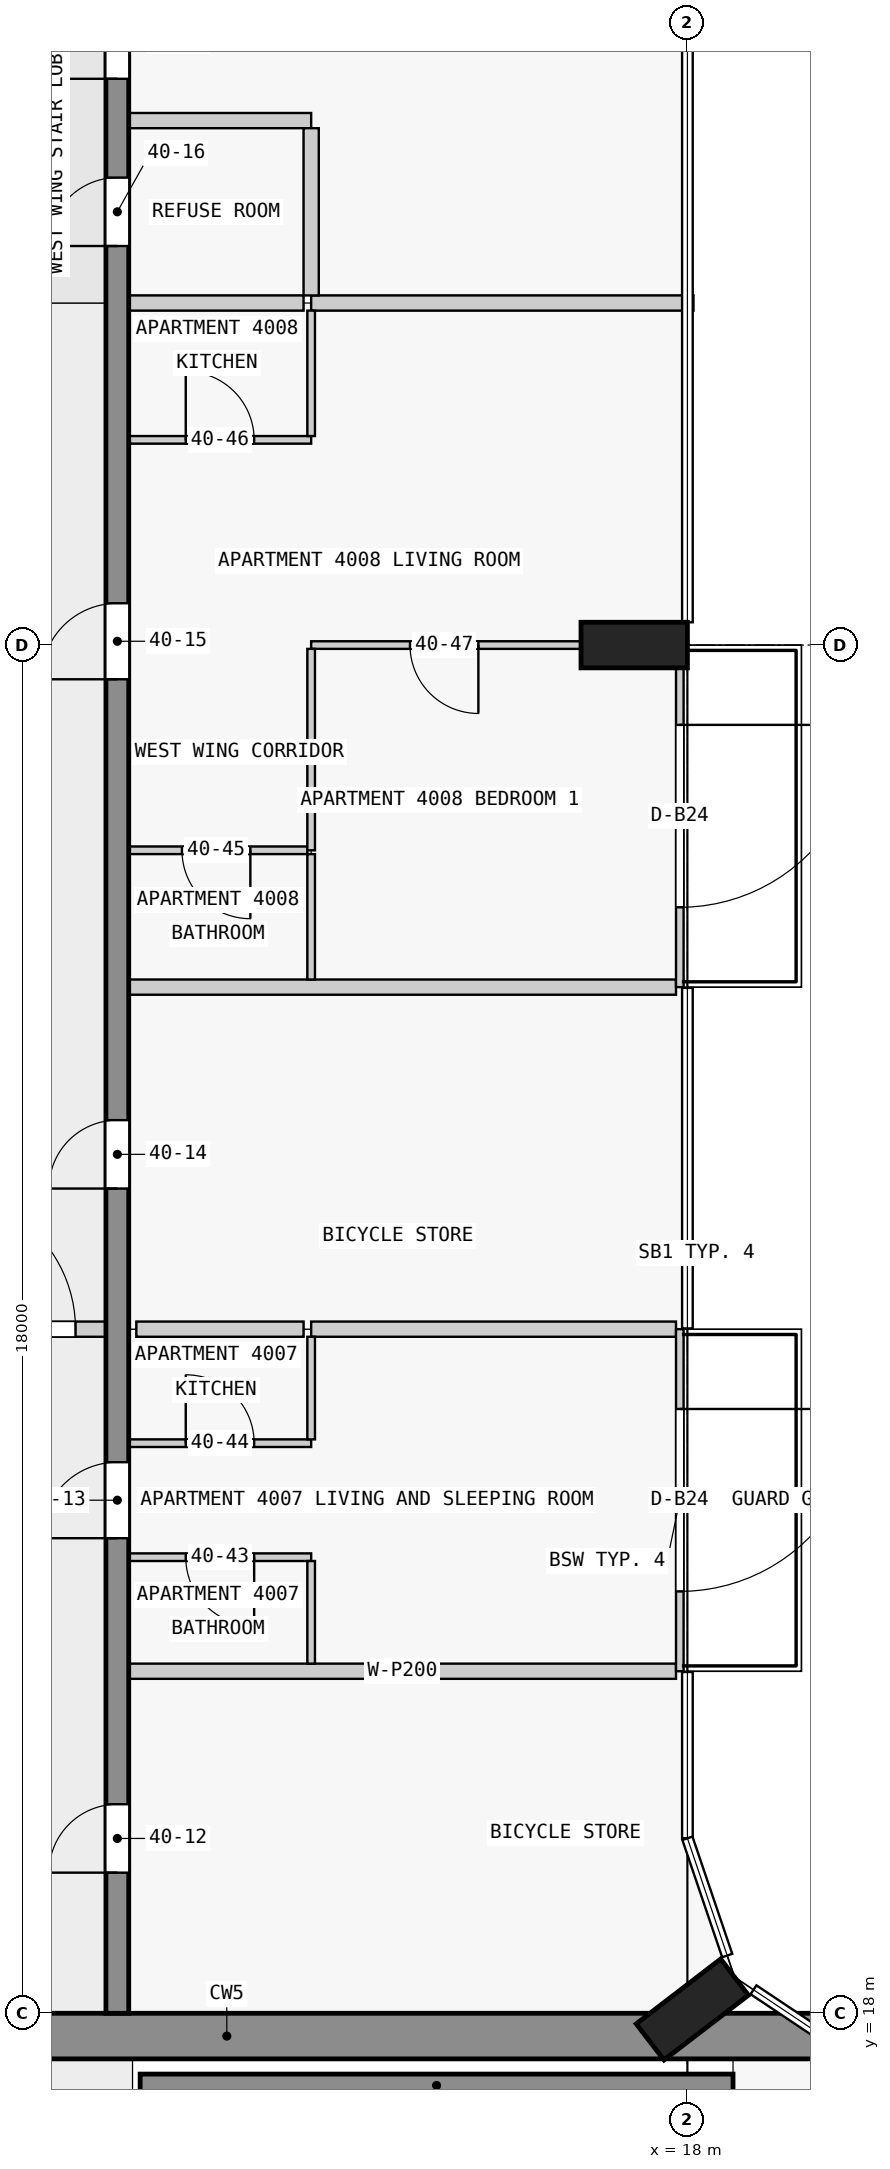
"""IFC4 building model, lengths in metres.
Left out: names, types, materials, properties, quantities, classifications, styles, units other than length and angle.
Written with IfcOpenShell. Run it as: python <this file> out.ifc"""

import sys

from ifc_helpers import new_model, si_unit, direction, frame, frame_2d, origin, origin_2d, place, context, subcontext, project, spatial, rectangle, extrude, element, fill, save


model = new_model("IFC4")
c1 = context("Model", 3, precision=1e-05, world=origin(), true_north=direction((0.0, 1.0)))
c2 = subcontext(c1, "Body", "Model", "MODEL_VIEW")
j1 = project(units=[si_unit("LENGTHUNIT", "METRE"), si_unit("PLANEANGLEUNIT", "RADIAN")], contexts=[c1])
p1 = place(None, origin())
s1 = spatial("IfcSite", under=j1, at=p1, CompositionType="ELEMENT")
p2 = place(p1, origin())
s2 = spatial("IfcBuilding", under=s1, at=p2, CompositionType="ELEMENT")
p3 = place(p2, frame((0.0, 0.0, 156.9)))
s3 = spatial("IfcBuildingStorey", under=s2, at=p3, CompositionType="ELEMENT", Elevation=156.9)
for number, where, z_axis, x_axis in (
    (1, (18.065, 18.05, 0.0), (0.0, 0.0, 1.0), (-0.609, 0.793, 0.0)),
    (2, (17.3, 36.0, 0.0), (0.0, 0.0, 1.0), (0.0, 1.0, 0.0)),
):
    element("IfcColumn", number, at=place(p3, frame(where, z_axis=z_axis, x_axis=x_axis)), inside=s3, PredefinedType="COLUMN", context=c2, shape_type="SweptSolid", body=[
        extrude(rectangle(XDim=0.6, YDim=1.4, at=origin_2d()), origin(), (0.0, 0.0, 1.0), 3.5),
    ])
p4 = place(p3, frame((1.38, 17.7, 0.0), z_axis=(0.0, 0.0, 1.0), x_axis=(1.0, 0.0, 0.0)))
e3 = element("IfcWall", 3, at=p4, inside=s3, PredefinedType="SHEAR", context=c2, shape_type="SweptSolid", body=[
    extrude(rectangle(XDim=21.12, YDim=0.6, at=frame_2d((10.56, 0.0))), origin(), (0.0, 0.0, 1.0), 3.25),
])
p5 = place(p4, frame((6.4, 0.0, 0.0)))
e4 = element("IfcOpeningElement", 4, at=p5, cuts=e3, PredefinedType="OPENING", context=c2, shape_type="SweptSolid", body=[
    extrude(rectangle(XDim=1.8, YDim=2.1, at=frame_2d((0.9, 1.05))), frame((0.0, 0.31, 0.0), z_axis=(0.0, -1.0, 0.0), x_axis=(1.0, 0.0, 0.0)), (0.0, 0.0, 1.0), 0.62),
])
p6 = place(p3, frame((10.8, 17.05, 0.0), z_axis=(0.0, 0.0, 1.0), x_axis=(1.0, 0.0, 0.0)))
e5 = element("IfcWall", 5, at=p6, inside=s3, PredefinedType="SHEAR", context=c2, shape_type="SweptSolid", body=[
    extrude(rectangle(XDim=7.8, YDim=0.3, at=frame_2d((3.9, 0.0))), origin(), (0.0, 0.0, 1.0), 3.25),
])
p7 = place(p3, frame((10.5, 18.0, 0.0), z_axis=(0.0, 0.0, 1.0), x_axis=(0.0, 1.0, 0.0)))
e6 = element("IfcWall", 6, at=p7, inside=s3, PredefinedType="SHEAR", context=c2, shape_type="SweptSolid", body=[
    extrude(rectangle(XDim=27.0, YDim=0.3, at=frame_2d((13.5, 0.0))), origin(), (0.0, 0.0, 1.0), 3.25),
])
p8 = place(p7, frame((1.85, 0.0, 0.0)))
e7 = element("IfcOpeningElement", 7, at=p8, cuts=e6, PredefinedType="OPENING", context=c2, shape_type="SweptSolid", body=[
    extrude(rectangle(XDim=0.9, YDim=2.1, at=frame_2d((0.45, 1.05))), frame((0.0, 0.16, 0.0), z_axis=(0.0, -1.0, 0.0), x_axis=(1.0, 0.0, 0.0)), (0.0, 0.0, 1.0), 0.32),
])
p9 = place(p7, frame((6.25, 0.0, 0.0)))
e8 = element("IfcOpeningElement", 8, at=p9, cuts=e6, PredefinedType="OPENING", context=c2, shape_type="SweptSolid", body=[
    extrude(rectangle(XDim=1.0, YDim=2.1, at=frame_2d((0.5, 1.05))), frame((0.0, 0.16, 0.0), z_axis=(0.0, -1.0, 0.0), x_axis=(1.0, 0.0, 0.0)), (0.0, 0.0, 1.0), 0.32),
])
p10 = place(p7, frame((10.85, 0.0, 0.0)))
e9 = element("IfcOpeningElement", 9, at=p10, cuts=e6, PredefinedType="OPENING", context=c2, shape_type="SweptSolid", body=[
    extrude(rectangle(XDim=0.9, YDim=2.1, at=frame_2d((0.45, 1.05))), frame((0.0, 0.16, 0.0), z_axis=(0.0, -1.0, 0.0), x_axis=(1.0, 0.0, 0.0)), (0.0, 0.0, 1.0), 0.32),
])
p11 = place(p7, frame((17.55, 0.0, 0.0)))
e10 = element("IfcOpeningElement", 10, at=p11, cuts=e6, PredefinedType="OPENING", context=c2, shape_type="SweptSolid", body=[
    extrude(rectangle(XDim=1.0, YDim=2.1, at=frame_2d((0.5, 1.05))), frame((0.0, 0.16, 0.0), z_axis=(0.0, -1.0, 0.0), x_axis=(1.0, 0.0, 0.0)), (0.0, 0.0, 1.0), 0.32),
])
p12 = place(p7, frame((23.25, 0.0, 0.0)))
e11 = element("IfcOpeningElement", 11, at=p12, cuts=e6, PredefinedType="OPENING", context=c2, shape_type="SweptSolid", body=[
    extrude(rectangle(XDim=0.9, YDim=2.1, at=frame_2d((0.45, 1.05))), frame((0.0, 0.16, 0.0), z_axis=(0.0, -1.0, 0.0), x_axis=(1.0, 0.0, 0.0)), (0.0, 0.0, 1.0), 0.32),
])
p13 = place(p7, frame((25.45, 0.0, 0.0)))
e12 = element("IfcOpeningElement", 12, at=p13, cuts=e6, PredefinedType="OPENING", context=c2, shape_type="SweptSolid", body=[
    extrude(rectangle(XDim=1.0, YDim=2.1, at=frame_2d((0.5, 1.05))), frame((0.0, 0.16, 0.0), z_axis=(0.0, -1.0, 0.0), x_axis=(1.0, 0.0, 0.0)), (0.0, 0.0, 1.0), 0.32),
])
p14 = place(p3, frame((17.9, 27.0, 0.0), z_axis=(0.0, 0.0, 1.0), x_axis=(0.0, -1.0, 0.0)))
e13 = element("IfcWall", 13, at=p14, inside=s3, PredefinedType="STANDARD", context=c2, shape_type="SweptSolid", body=[
    extrude(rectangle(XDim=4.5, YDim=0.1, at=frame_2d((2.25, 0.0))), origin(), (0.0, 0.0, 1.0), 3.25),
])
p15 = place(p14, frame((1.05, 0.0, 0.0)))
e14 = element("IfcOpeningElement", 14, at=p15, cuts=e13, PredefinedType="OPENING", context=c2, shape_type="SweptSolid", body=[
    extrude(rectangle(XDim=2.4, YDim=2.4, at=frame_2d((1.2, 1.2))), frame((0.0, 0.06, 0.0), z_axis=(0.0, -1.0, 0.0), x_axis=(1.0, 0.0, 0.0)), (0.0, 0.0, 1.0), 0.12),
])
p16 = place(p3, frame((17.9, 36.0, 0.0), z_axis=(0.0, 0.0, 1.0), x_axis=(0.0, -1.0, 0.0)))
e15 = element("IfcWall", 15, at=p16, inside=s3, PredefinedType="STANDARD", context=c2, shape_type="SweptSolid", body=[
    extrude(rectangle(XDim=4.5, YDim=0.1, at=frame_2d((2.25, 0.0))), origin(), (0.0, 0.0, 1.0), 3.25),
])
p17 = place(p16, frame((1.05, 0.0, 0.0)))
e16 = element("IfcOpeningElement", 16, at=p17, cuts=e15, PredefinedType="OPENING", context=c2, shape_type="SweptSolid", body=[
    extrude(rectangle(XDim=2.4, YDim=2.4, at=frame_2d((1.2, 1.2))), frame((0.0, 0.06, 0.0), z_axis=(0.0, -1.0, 0.0), x_axis=(1.0, 0.0, 0.0)), (0.0, 0.0, 1.0), 0.12),
])
p18 = place(p3, frame((17.85, 22.5, 0.0), z_axis=(0.0, 0.0, 1.0), x_axis=(-1.0, 0.0, 0.0)))
e17 = element("IfcWall", 17, at=p18, inside=s3, PredefinedType="PARTITIONING", context=c2, shape_type="SweptSolid", body=[
    extrude(rectangle(XDim=7.2, YDim=0.2, at=frame_2d((3.6, 0.0))), origin(), (0.0, 0.0, 1.0), 3.25),
])
p19 = place(p3, frame((13.05, 24.0, 0.0), z_axis=(0.0, 0.0, 1.0), x_axis=(-1.0, 0.0, 0.0)))
e18 = element("IfcWall", 18, at=p19, inside=s3, PredefinedType="PARTITIONING", context=c2, shape_type="SweptSolid", body=[
    extrude(rectangle(XDim=2.4, YDim=0.1, at=frame_2d((1.2, 0.0))), origin(), (0.0, 0.0, 1.0), 3.25),
])
p20 = place(p19, frame((0.75, 0.0, 0.0)))
e19 = element("IfcOpeningElement", 19, at=p20, cuts=e18, PredefinedType="OPENING", context=c2, shape_type="SweptSolid", body=[
    extrude(rectangle(XDim=0.9, YDim=2.1, at=frame_2d((0.45, 1.05))), frame((0.0, 0.06, 0.0), z_axis=(0.0, -1.0, 0.0), x_axis=(1.0, 0.0, 0.0)), (0.0, 0.0, 1.0), 0.12),
])
p21 = place(p3, frame((10.65, 25.5, 0.0), z_axis=(0.0, 0.0, 1.0), x_axis=(1.0, 0.0, 0.0)))
e20 = element("IfcWall", 20, at=p21, inside=s3, PredefinedType="PARTITIONING", context=c2, shape_type="SweptSolid", body=[
    extrude(rectangle(XDim=2.4, YDim=0.1, at=frame_2d((1.2, 0.0))), origin(), (0.0, 0.0, 1.0), 3.25),
])
p22 = place(p21, frame((0.75, 0.0, 0.0)))
e21 = element("IfcOpeningElement", 21, at=p22, cuts=e20, PredefinedType="OPENING", context=c2, shape_type="SweptSolid", body=[
    extrude(rectangle(XDim=0.9, YDim=2.1, at=frame_2d((0.45, 1.05))), frame((0.0, 0.06, 0.0), z_axis=(0.0, -1.0, 0.0), x_axis=(1.0, 0.0, 0.0)), (0.0, 0.0, 1.0), 0.12),
])
p23 = place(p3, frame((12.95, 27.0, 0.0), z_axis=(0.0, 0.0, 1.0), x_axis=(-1.0, 0.0, 0.0)))
e22 = element("IfcWall", 22, at=p23, inside=s3, PredefinedType="PARTITIONING", context=c2, shape_type="SweptSolid", body=[
    extrude(rectangle(XDim=2.2, YDim=0.2, at=frame_2d((1.1, 0.0))), origin(), (0.0, 0.0, 1.0), 3.25),
])
p24 = place(p3, frame((13.05, 27.0, 0.0), z_axis=(0.0, 0.0, 1.0), x_axis=(1.0, 0.0, 0.0)))
e23 = element("IfcWall", 23, at=p24, inside=s3, PredefinedType="PARTITIONING", context=c2, shape_type="SweptSolid", body=[
    extrude(rectangle(XDim=4.8, YDim=0.2, at=frame_2d((2.4, 0.0))), origin(), (0.0, 0.0, 1.0), 3.25),
])
p25 = place(p3, frame((17.85, 31.5, 0.0), z_axis=(0.0, 0.0, 1.0), x_axis=(-1.0, 0.0, 0.0)))
e24 = element("IfcWall", 24, at=p25, inside=s3, PredefinedType="PARTITIONING", context=c2, shape_type="SweptSolid", body=[
    extrude(rectangle(XDim=7.2, YDim=0.2, at=frame_2d((3.6, 0.0))), origin(), (0.0, 0.0, 1.0), 3.25),
])
p26 = place(p3, frame((13.0, 33.3, 0.0), z_axis=(0.0, 0.0, 1.0), x_axis=(-1.0, 0.0, 0.0)))
e25 = element("IfcWall", 25, at=p26, inside=s3, PredefinedType="PARTITIONING", context=c2, shape_type="SweptSolid", body=[
    extrude(rectangle(XDim=2.35, YDim=0.1, at=frame_2d((1.175, 0.0))), origin(), (0.0, 0.0, 1.0), 3.25),
])
p27 = place(p26, frame((0.75, 0.0, 0.0)))
e26 = element("IfcOpeningElement", 26, at=p27, cuts=e25, PredefinedType="OPENING", context=c2, shape_type="SweptSolid", body=[
    extrude(rectangle(XDim=0.9, YDim=2.1, at=frame_2d((0.45, 1.05))), frame((0.0, 0.06, 0.0), z_axis=(0.0, -1.0, 0.0), x_axis=(1.0, 0.0, 0.0)), (0.0, 0.0, 1.0), 0.12),
])
p28 = place(p3, frame((16.6, 36.0, 0.0), z_axis=(0.0, 0.0, 1.0), x_axis=(-1.0, 0.0, 0.0)))
e27 = element("IfcWall", 27, at=p28, inside=s3, PredefinedType="PARTITIONING", context=c2, shape_type="SweptSolid", body=[
    extrude(rectangle(XDim=3.55, YDim=0.1, at=frame_2d((1.775, 0.0))), origin(), (0.0, 0.0, 1.0), 3.25),
])
p29 = place(p28, frame((1.35, 0.0, 0.0)))
e28 = element("IfcOpeningElement", 28, at=p29, cuts=e27, PredefinedType="OPENING", context=c2, shape_type="SweptSolid", body=[
    extrude(rectangle(XDim=0.9, YDim=2.1, at=frame_2d((0.45, 1.05))), frame((0.0, 0.06, 0.0), z_axis=(0.0, -1.0, 0.0), x_axis=(1.0, 0.0, 0.0)), (0.0, 0.0, 1.0), 0.12),
])
p30 = place(p3, frame((10.65, 38.7, 0.0), z_axis=(0.0, 0.0, 1.0), x_axis=(1.0, 0.0, 0.0)))
e29 = element("IfcWall", 29, at=p30, inside=s3, PredefinedType="PARTITIONING", context=c2, shape_type="SweptSolid", body=[
    extrude(rectangle(XDim=2.4, YDim=0.1, at=frame_2d((1.2, 0.0))), origin(), (0.0, 0.0, 1.0), 3.25),
])
p31 = place(p30, frame((0.75, 0.0, 0.0)))
e30 = element("IfcOpeningElement", 30, at=p31, cuts=e29, PredefinedType="OPENING", context=c2, shape_type="SweptSolid", body=[
    extrude(rectangle(XDim=0.9, YDim=2.1, at=frame_2d((0.45, 1.05))), frame((0.0, 0.06, 0.0), z_axis=(0.0, -1.0, 0.0), x_axis=(1.0, 0.0, 0.0)), (0.0, 0.0, 1.0), 0.12),
])
p32 = place(p3, frame((12.95, 40.5, 0.0), z_axis=(0.0, 0.0, 1.0), x_axis=(-1.0, 0.0, 0.0)))
e31 = element("IfcWall", 31, at=p32, inside=s3, PredefinedType="PARTITIONING", context=c2, shape_type="SweptSolid", body=[
    extrude(rectangle(XDim=2.3, YDim=0.2, at=frame_2d((1.15, 0.0))), origin(), (0.0, 0.0, 1.0), 3.25),
])
p33 = place(p3, frame((13.05, 40.5, 0.0), z_axis=(0.0, 0.0, 1.0), x_axis=(1.0, 0.0, 0.0)))
e32 = element("IfcWall", 32, at=p33, inside=s3, PredefinedType="PARTITIONING", context=c2, shape_type="SweptSolid", body=[
    extrude(rectangle(XDim=5.03, YDim=0.2, at=frame_2d((2.515, 0.0))), origin(), (0.0, 0.0, 1.0), 3.25),
])
p34 = place(p3, frame((13.05, 42.9, 0.0), z_axis=(0.0, 0.0, 1.0), x_axis=(-1.0, 0.0, 0.0)))
e33 = element("IfcWall", 33, at=p34, inside=s3, PredefinedType="PARTITIONING", context=c2, shape_type="SweptSolid", body=[
    extrude(rectangle(XDim=2.4, YDim=0.2, at=frame_2d((1.2, 0.0))), origin(), (0.0, 0.0, 1.0), 3.25),
])
p35 = place(p3, frame((13.05, 35.95, 0.0), z_axis=(0.0, 0.0, 1.0), x_axis=(0.0, -1.0, 0.0)))
e34 = element("IfcWall", 34, at=p35, inside=s3, PredefinedType="PARTITIONING", context=c2, shape_type="SweptSolid", body=[
    extrude(rectangle(XDim=2.65, YDim=0.1, at=frame_2d((1.325, 0.0))), origin(), (0.0, 0.0, 1.0), 3.25),
])
for number, where, z_axis, x_axis in (
    (35, (13.05, 22.6, 0.0), (0.0, 0.0, 1.0), (0.0, 1.0, 0.0)),
    (36, (13.05, 25.55, 0.0), (0.0, 0.0, 1.0), (0.0, 1.0, 0.0)),
):
    element("IfcWall", number, at=place(p3, frame(where, z_axis=z_axis, x_axis=x_axis)), inside=s3, PredefinedType="PARTITIONING", context=c2, shape_type="SweptSolid", body=[
        extrude(rectangle(XDim=1.35, YDim=0.1, at=frame_2d((0.675, 0.0))), origin(), (0.0, 0.0, 1.0), 3.25),
    ])
for number, where, z_axis, x_axis in (
    (37, (13.05, 31.6, 0.0), (0.0, 0.0, 1.0), (0.0, 1.0, 0.0)),
    (38, (13.05, 38.75, 0.0), (0.0, 0.0, 1.0), (0.0, 1.0, 0.0)),
):
    element("IfcWall", number, at=place(p3, frame(where, z_axis=z_axis, x_axis=x_axis)), inside=s3, PredefinedType="PARTITIONING", context=c2, shape_type="SweptSolid", body=[
        extrude(rectangle(XDim=1.65, YDim=0.1, at=frame_2d((0.825, 0.0))), origin(), (0.0, 0.0, 1.0), 3.25),
    ])
p36 = place(p3, frame((13.05, 40.6, 0.0), z_axis=(0.0, 0.0, 1.0), x_axis=(0.0, 1.0, 0.0)))
e39 = element("IfcWall", 39, at=p36, inside=s3, PredefinedType="PARTITIONING", context=c2, shape_type="SweptSolid", body=[
    extrude(rectangle(XDim=2.2, YDim=0.2, at=frame_2d((1.1, 0.0))), origin(), (0.0, 0.0, 1.0), 3.25),
])
p37 = place(p3, frame((7.45, 27.0, 0.0), z_axis=(0.0, 0.0, 1.0), x_axis=(1.0, 0.0, 0.0)))
e40 = element("IfcWall", 40, at=p37, inside=s3, PredefinedType="PARTITIONING", context=c2, shape_type="SweptSolid", body=[
    extrude(rectangle(XDim=3.2, YDim=0.2, at=frame_2d((1.6, 0.0))), origin(), (0.0, 0.0, 1.0), 3.25),
])
p38 = place(p37, frame((0.7, 0.0, 0.0)))
e41 = element("IfcOpeningElement", 41, at=p38, cuts=e40, PredefinedType="OPENING", context=c2, shape_type="SweptSolid", body=[
    extrude(rectangle(XDim=1.8, YDim=2.1, at=frame_2d((0.9, 1.05))), frame((0.0, 0.11, 0.0), z_axis=(0.0, -1.0, 0.0), x_axis=(1.0, 0.0, 0.0)), (0.0, 0.0, 1.0), 0.22),
])
p39 = place(p15, origin())
e42 = element("IfcDoor", 42, at=p39, inside=s3, OperationType="SINGLE_SWING_LEFT", PredefinedType="DOOR", context=c2, shape_type="SweptSolid", body=[
    extrude(rectangle(XDim=2.4, YDim=2.4, at=frame_2d((1.2, 1.2))), frame((0.0, 0.025, 0.0), z_axis=(0.0, -1.0, 0.0), x_axis=(1.0, 0.0, 0.0)), (0.0, 0.0, 1.0), 0.05),
])
fill(e14, e42)
p40 = place(p17, origin())
e43 = element("IfcDoor", 43, at=p40, inside=s3, OperationType="SINGLE_SWING_LEFT", PredefinedType="DOOR", context=c2, shape_type="SweptSolid", body=[
    extrude(rectangle(XDim=2.4, YDim=2.4, at=frame_2d((1.2, 1.2))), frame((0.0, 0.025, 0.0), z_axis=(0.0, -1.0, 0.0), x_axis=(1.0, 0.0, 0.0)), (0.0, 0.0, 1.0), 0.05),
])
fill(e16, e43)
p41 = place(p8, origin())
e44 = element("IfcDoor", 44, at=p41, inside=s3, OperationType="SINGLE_SWING_LEFT", PredefinedType="DOOR", context=c2, shape_type="SweptSolid", body=[
    extrude(rectangle(XDim=0.9, YDim=2.1, at=frame_2d((0.45, 1.05))), frame((0.0, 0.025, 0.0), z_axis=(0.0, -1.0, 0.0), x_axis=(1.0, 0.0, 0.0)), (0.0, 0.0, 1.0), 0.05),
])
fill(e7, e44)
p42 = place(p9, origin())
e45 = element("IfcDoor", 45, at=p42, inside=s3, OperationType="SINGLE_SWING_LEFT", PredefinedType="DOOR", context=c2, shape_type="SweptSolid", body=[
    extrude(rectangle(XDim=1.0, YDim=2.1, at=frame_2d((0.5, 1.05))), frame((0.0, 0.025, 0.0), z_axis=(0.0, -1.0, 0.0), x_axis=(1.0, 0.0, 0.0)), (0.0, 0.0, 1.0), 0.05),
])
fill(e8, e45)
p43 = place(p10, origin())
e46 = element("IfcDoor", 46, at=p43, inside=s3, OperationType="SINGLE_SWING_LEFT", PredefinedType="DOOR", context=c2, shape_type="SweptSolid", body=[
    extrude(rectangle(XDim=0.9, YDim=2.1, at=frame_2d((0.45, 1.05))), frame((0.0, 0.025, 0.0), z_axis=(0.0, -1.0, 0.0), x_axis=(1.0, 0.0, 0.0)), (0.0, 0.0, 1.0), 0.05),
])
fill(e9, e46)
p44 = place(p11, origin())
e47 = element("IfcDoor", 47, at=p44, inside=s3, OperationType="SINGLE_SWING_RIGHT", PredefinedType="DOOR", context=c2, shape_type="SweptSolid", body=[
    extrude(rectangle(XDim=1.0, YDim=2.1, at=frame_2d((0.5, 1.05))), frame((0.0, 0.025, 0.0), z_axis=(0.0, -1.0, 0.0), x_axis=(1.0, 0.0, 0.0)), (0.0, 0.0, 1.0), 0.05),
])
fill(e10, e47)
p45 = place(p12, origin())
e48 = element("IfcDoor", 48, at=p45, inside=s3, OperationType="SINGLE_SWING_RIGHT", PredefinedType="DOOR", context=c2, shape_type="SweptSolid", body=[
    extrude(rectangle(XDim=0.9, YDim=2.1, at=frame_2d((0.45, 1.05))), frame((0.0, 0.025, 0.0), z_axis=(0.0, -1.0, 0.0), x_axis=(1.0, 0.0, 0.0)), (0.0, 0.0, 1.0), 0.05),
])
fill(e11, e48)
p46 = place(p13, origin())
e49 = element("IfcDoor", 49, at=p46, inside=s3, OperationType="SINGLE_SWING_RIGHT", PredefinedType="DOOR", context=c2, shape_type="SweptSolid", body=[
    extrude(rectangle(XDim=1.0, YDim=2.1, at=frame_2d((0.5, 1.05))), frame((0.0, 0.025, 0.0), z_axis=(0.0, -1.0, 0.0), x_axis=(1.0, 0.0, 0.0)), (0.0, 0.0, 1.0), 0.05),
])
fill(e12, e49)
p47 = place(p38, origin())
e50 = element("IfcDoor", 50, at=p47, inside=s3, OperationType="SINGLE_SWING_LEFT", PredefinedType="DOOR", context=c2, shape_type="SweptSolid", body=[
    extrude(rectangle(XDim=1.8, YDim=2.1, at=frame_2d((0.9, 1.05))), frame((0.0, 0.025, 0.0), z_axis=(0.0, -1.0, 0.0), x_axis=(1.0, 0.0, 0.0)), (0.0, 0.0, 1.0), 0.05),
])
fill(e41, e50)
p48 = place(p20, origin())
e51 = element("IfcDoor", 51, at=p48, inside=s3, OperationType="SINGLE_SWING_LEFT", PredefinedType="DOOR", context=c2, shape_type="SweptSolid", body=[
    extrude(rectangle(XDim=0.9, YDim=2.1, at=frame_2d((0.45, 1.05))), frame((0.0, 0.025, 0.0), z_axis=(0.0, -1.0, 0.0), x_axis=(1.0, 0.0, 0.0)), (0.0, 0.0, 1.0), 0.05),
])
fill(e19, e51)
p49 = place(p22, origin())
e52 = element("IfcDoor", 52, at=p49, inside=s3, OperationType="SINGLE_SWING_LEFT", PredefinedType="DOOR", context=c2, shape_type="SweptSolid", body=[
    extrude(rectangle(XDim=0.9, YDim=2.1, at=frame_2d((0.45, 1.05))), frame((0.0, 0.025, 0.0), z_axis=(0.0, -1.0, 0.0), x_axis=(1.0, 0.0, 0.0)), (0.0, 0.0, 1.0), 0.05),
])
fill(e21, e52)
p50 = place(p27, origin())
e53 = element("IfcDoor", 53, at=p50, inside=s3, OperationType="SINGLE_SWING_RIGHT", PredefinedType="DOOR", context=c2, shape_type="SweptSolid", body=[
    extrude(rectangle(XDim=0.9, YDim=2.1, at=frame_2d((0.45, 1.05))), frame((0.0, 0.025, 0.0), z_axis=(0.0, -1.0, 0.0), x_axis=(1.0, 0.0, 0.0)), (0.0, 0.0, 1.0), 0.05),
])
fill(e26, e53)
p51 = place(p31, origin())
e54 = element("IfcDoor", 54, at=p51, inside=s3, OperationType="SINGLE_SWING_LEFT", PredefinedType="DOOR", context=c2, shape_type="SweptSolid", body=[
    extrude(rectangle(XDim=0.9, YDim=2.1, at=frame_2d((0.45, 1.05))), frame((0.0, 0.025, 0.0), z_axis=(0.0, -1.0, 0.0), x_axis=(1.0, 0.0, 0.0)), (0.0, 0.0, 1.0), 0.05),
])
fill(e30, e54)
p52 = place(p29, origin())
e55 = element("IfcDoor", 55, at=p52, inside=s3, OperationType="SINGLE_SWING_RIGHT", PredefinedType="DOOR", context=c2, shape_type="SweptSolid", body=[
    extrude(rectangle(XDim=0.9, YDim=2.1, at=frame_2d((0.45, 1.05))), frame((0.0, 0.025, 0.0), z_axis=(0.0, -1.0, 0.0), x_axis=(1.0, 0.0, 0.0)), (0.0, 0.0, 1.0), 0.05),
])
fill(e28, e55)
save(model, sys.argv[1])
